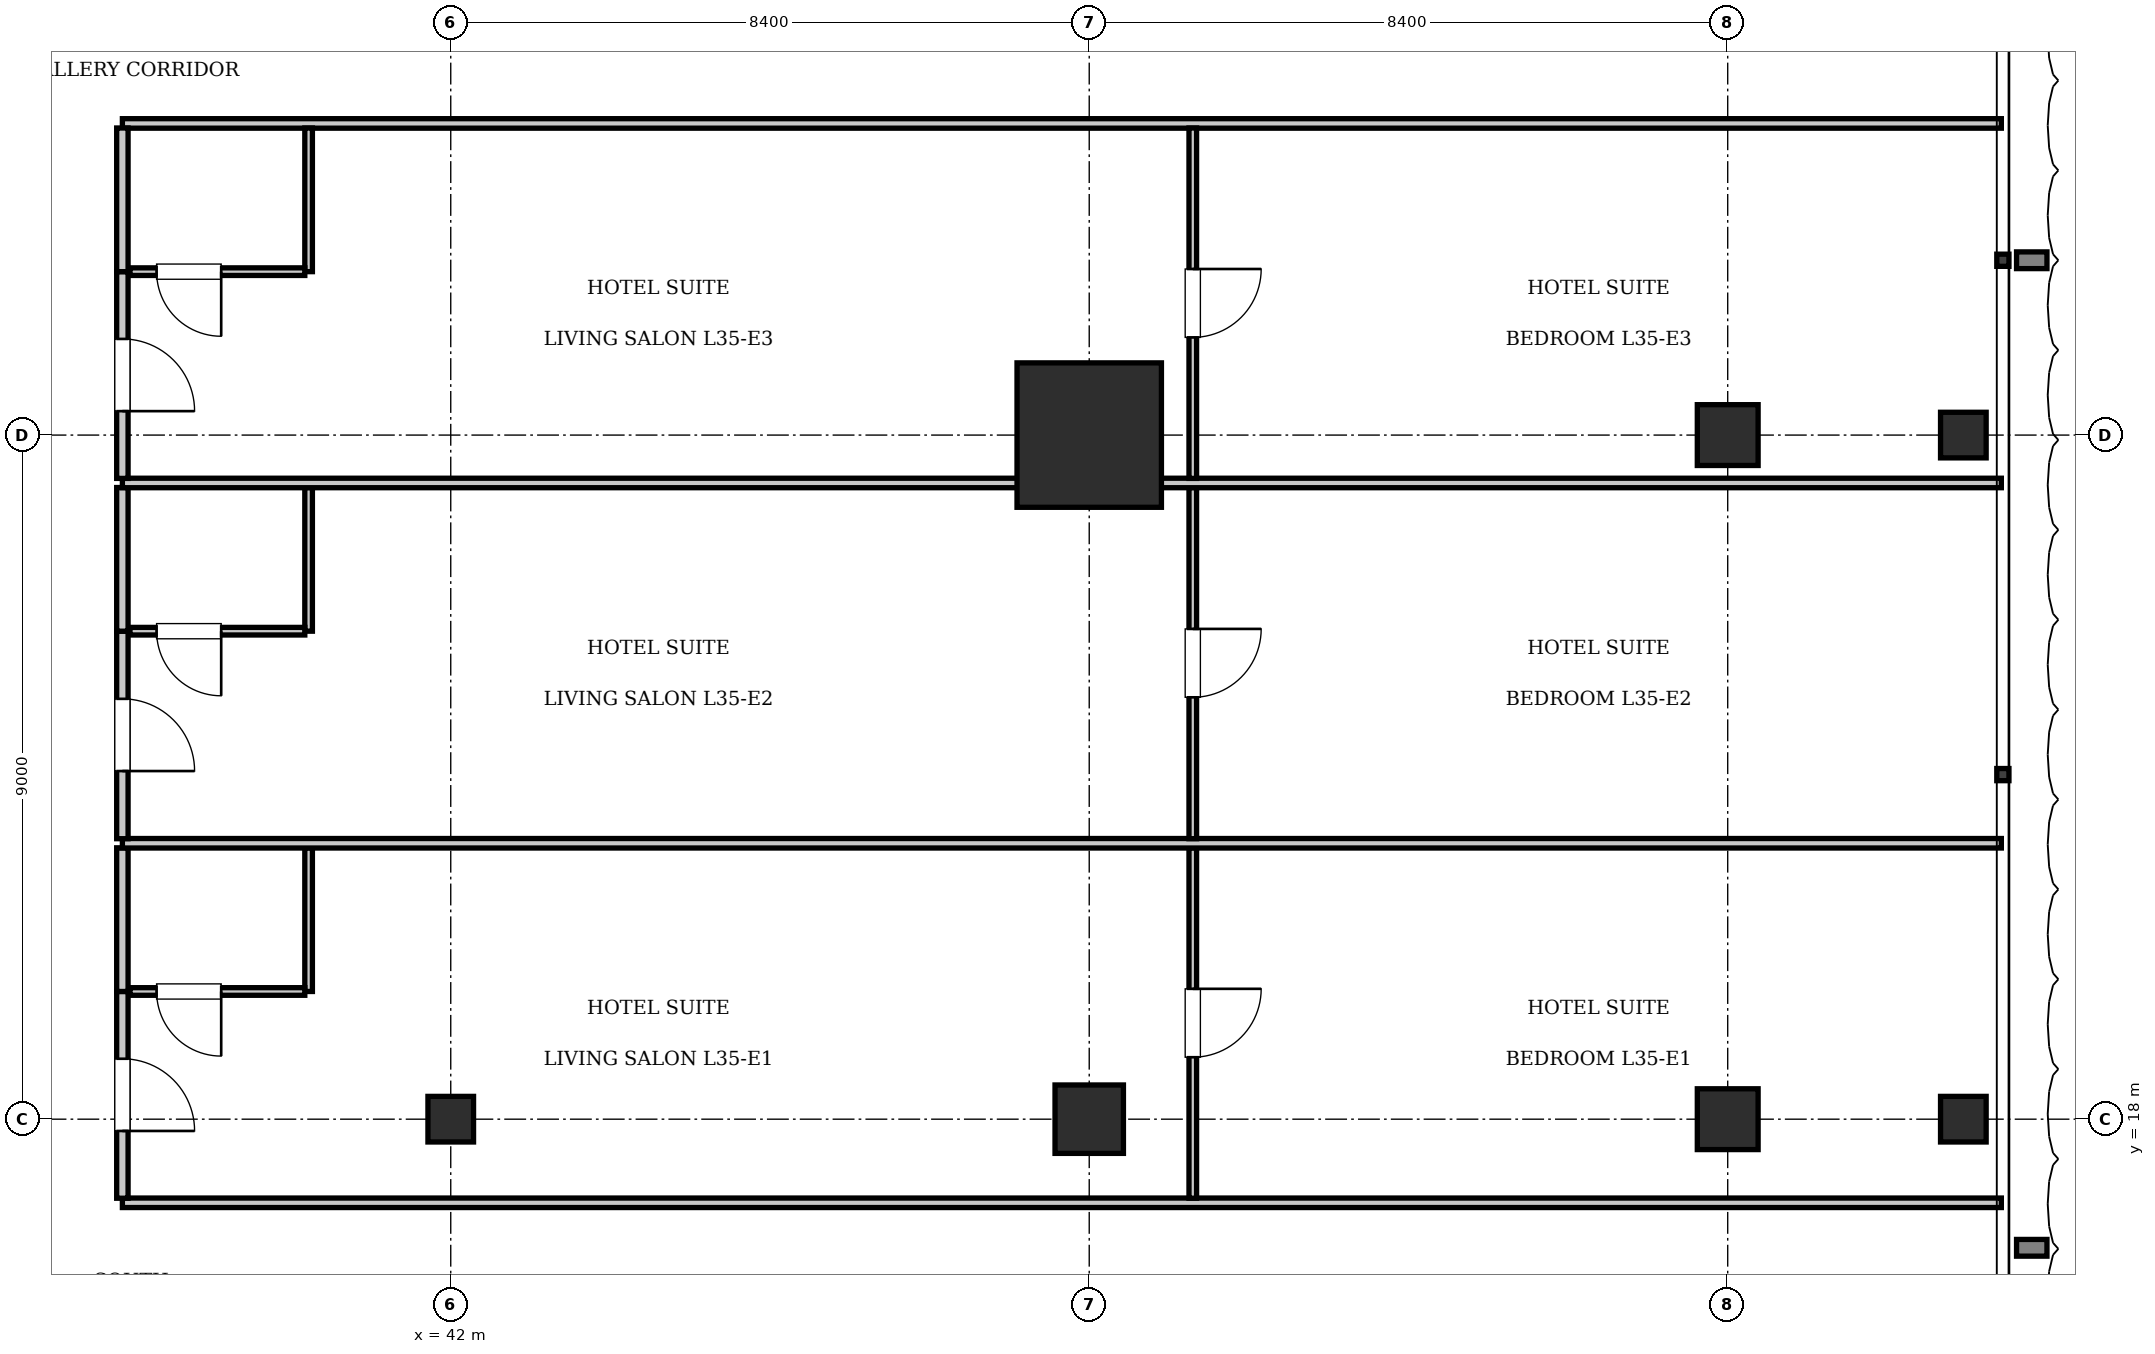
"""IFC4 building model, lengths in metres.
Left out: names, types, materials, properties, quantities, classifications, styles, units other than length and angle.
Written with IfcOpenShell. Run it as: python <this file> out.ifc"""

import sys

from ifc_helpers import new_model, si_unit, direction, frame, frame_2d, origin, origin_2d, place, context, subcontext, project, spatial, rectangle, i_section, extrude, element, fill, save


model = new_model("IFC4")
c1 = context("Model", 3, precision=1e-05, world=origin(), true_north=direction((0.0, 1.0)))
c2 = subcontext(c1, "Body", "Model", "MODEL_VIEW")
j1 = project(units=[si_unit("LENGTHUNIT", "METRE"), si_unit("PLANEANGLEUNIT", "RADIAN")], contexts=[c1])
p1 = place(None, origin())
s1 = spatial("IfcSite", under=j1, at=p1, CompositionType="ELEMENT")
p2 = place(p1, origin())
s2 = spatial("IfcBuilding", under=s1, at=p2, CompositionType="ELEMENT")
p3 = place(p2, frame((0.0, 0.0, 146.65)))
s3 = spatial("IfcBuildingStorey", under=s2, at=p3, CompositionType="ELEMENT", Elevation=146.65)
p4 = place(p3, frame((50.4, 27.0, 0.0), z_axis=(0.0, 0.0, 1.0), x_axis=(1.0, 0.0, 0.0)))
e1 = element("IfcColumn", 1, at=p4, inside=s3, PredefinedType="COLUMN", context=c2, shape_type="SweptSolid", body=[
    extrude(rectangle(XDim=1.9, YDim=1.9, at=origin_2d()), origin(), (0.0, 0.0, 1.0), 3.85),
])
p5 = place(p3, frame((50.4, 18.0, 0.0), z_axis=(0.0, 0.0, 1.0), x_axis=(1.0, 0.0, 0.0)))
e2 = element("IfcColumn", 2, at=p5, inside=s3, PredefinedType="COLUMN", context=c2, shape_type="SweptSolid", body=[
    extrude(rectangle(XDim=0.9, YDim=0.9, at=origin_2d()), origin(), (0.0, 0.0, 1.0), 3.85),
])
p6 = place(p3, frame((42.0, 18.0, 0.0), z_axis=(0.0, 0.0, 1.0), x_axis=(1.0, 0.0, 0.0)))
e3 = element("IfcColumn", 3, at=p6, inside=s3, PredefinedType="COLUMN", context=c2, shape_type="SweptSolid", body=[
    extrude(i_section(OverallWidth=0.6, OverallDepth=0.6, WebThickness=0.025, FlangeThickness=0.038, at=origin_2d()), origin(), (0.0, 0.0, 1.0), 3.85),
])
for number, where, z_axis, x_axis in (
    (4, (58.8, 18.0, 0.0), (0.0, 0.0, 1.0), (1.0, 0.0, 0.0)),
    (5, (58.8, 27.0, 0.0), (0.0, 0.0, 1.0), (1.0, 0.0, 0.0)),
):
    element("IfcColumn", number, at=place(p3, frame(where, z_axis=z_axis, x_axis=x_axis)), inside=s3, PredefinedType="COLUMN", context=c2, shape_type="SweptSolid", body=[
        extrude(rectangle(XDim=0.8, YDim=0.8, at=origin_2d()), origin(), (0.0, 0.0, 1.0), 3.85),
    ])
for number, where, z_axis, x_axis in (
    (6, (61.9, 18.0, 0.0), (0.0, 0.0, 1.0), (1.0, 0.0, 0.0)),
    (7, (61.9, 27.0, 0.0), (0.0, 0.0, 1.0), (1.0, 0.0, 0.0)),
):
    element("IfcColumn", number, at=place(p3, frame(where, z_axis=z_axis, x_axis=x_axis)), inside=s3, PredefinedType="COLUMN", context=c2, shape_type="SweptSolid", body=[
        extrude(i_section(OverallWidth=0.6, OverallDepth=0.6, WebThickness=0.025, FlangeThickness=0.038, at=origin_2d()), origin(), (0.0, 0.0, 1.0), 3.85),
    ])
for number, where, z_axis, x_axis in (
    (8, (37.68, 16.9, 0.0), (0.0, 0.0, 1.0), (1.0, 0.0, 0.0)),
    (9, (37.68, 31.1, 0.0), (0.0, 0.0, 1.0), (1.0, 0.0, 0.0)),
):
    element("IfcWall", number, at=place(p3, frame(where, z_axis=z_axis, x_axis=x_axis)), inside=s3, PredefinedType="PARTITIONING", context=c2, shape_type="SweptSolid", body=[
        extrude(rectangle(XDim=24.72, YDim=0.125, at=frame_2d((12.36, 0.0))), origin(), (0.0, 0.0, 1.0), 3.61),
    ])
p7 = place(p3, frame((37.68, 16.96, 0.0), z_axis=(0.0, 0.0, 1.0), x_axis=(0.0, 1.0, 0.0)))
e10 = element("IfcWall", 10, at=p7, inside=s3, PredefinedType="PARTITIONING", context=c2, shape_type="SweptSolid", body=[
    extrude(rectangle(XDim=2.72, YDim=0.15, at=frame_2d((1.36, 0.0))), origin(), (0.0, 0.0, 1.0), 3.293),
])
p8 = place(p7, frame((0.885, 0.0, 0.0)))
e11 = element("IfcOpeningElement", 11, at=p8, cuts=e10, PredefinedType="OPENING", context=c2, shape_type="SweptSolid", body=[
    extrude(rectangle(XDim=0.95, YDim=2.15, at=frame_2d((0.475, 1.075))), frame((0.0, 0.085, 0.0), z_axis=(0.0, -1.0, 0.0), x_axis=(1.0, 0.0, 0.0)), (0.0, 0.0, 1.0), 0.17),
])
p9 = place(p3, frame((37.68, 19.68, 0.0), z_axis=(0.0, 0.0, 1.0), x_axis=(0.0, 1.0, 0.0)))
e12 = element("IfcWall", 12, at=p9, inside=s3, PredefinedType="PARTITIONING", context=c2, shape_type="SweptSolid", body=[
    extrude(rectangle(XDim=1.89, YDim=0.15, at=frame_2d((0.945, 0.0))), origin(), (0.0, 0.0, 1.0), 3.61),
])
p10 = place(p3, frame((40.13, 19.68, 0.0), z_axis=(0.0, 0.0, 1.0), x_axis=(0.0, 1.0, 0.0)))
e13 = element("IfcWall", 13, at=p10, inside=s3, PredefinedType="PARTITIONING", context=c2, shape_type="SweptSolid", body=[
    extrude(rectangle(XDim=1.89, YDim=0.1, at=frame_2d((0.945, 0.0))), origin(), (0.0, 0.0, 1.0), 3.61),
])
p11 = place(p3, frame((37.78, 19.68, 0.0), z_axis=(0.0, 0.0, 1.0), x_axis=(1.0, 0.0, 0.0)))
e14 = element("IfcWall", 14, at=p11, inside=s3, PredefinedType="PARTITIONING", context=c2, shape_type="SweptSolid", body=[
    extrude(rectangle(XDim=2.3, YDim=0.1, at=frame_2d((1.15, 0.0))), origin(), (0.0, 0.0, 1.0), 3.61),
])
p12 = place(p11, frame((0.35, 0.0, 0.0)))
e15 = element("IfcOpeningElement", 15, at=p12, cuts=e14, PredefinedType="OPENING", context=c2, shape_type="SweptSolid", body=[
    extrude(rectangle(XDim=0.85, YDim=2.1, at=frame_2d((0.425, 1.05))), frame((0.0, 0.06, 0.0), z_axis=(0.0, -1.0, 0.0), x_axis=(1.0, 0.0, 0.0)), (0.0, 0.0, 1.0), 0.12),
])
p13 = place(p3, frame((51.762, 16.96, 0.0), z_axis=(0.0, 0.0, 1.0), x_axis=(0.0, 1.0, 0.0)))
e16 = element("IfcWall", 16, at=p13, inside=s3, PredefinedType="PARTITIONING", context=c2, shape_type="SweptSolid", body=[
    extrude(rectangle(XDim=4.61, YDim=0.1, at=frame_2d((2.305, 0.0))), origin(), (0.0, 0.0, 1.0), 3.61),
])
p14 = place(p13, frame((1.855, 0.0, 0.0)))
e17 = element("IfcOpeningElement", 17, at=p14, cuts=e16, PredefinedType="OPENING", context=c2, shape_type="SweptSolid", body=[
    extrude(rectangle(XDim=0.9, YDim=2.1, at=frame_2d((0.45, 1.05))), frame((0.0, 0.06, 0.0), z_axis=(0.0, -1.0, 0.0), x_axis=(1.0, 0.0, 0.0)), (0.0, 0.0, 1.0), 0.12),
])
p15 = place(p3, frame((37.68, 21.63, 0.0), z_axis=(0.0, 0.0, 1.0), x_axis=(1.0, 0.0, 0.0)))
e18 = element("IfcWall", 18, at=p15, inside=s3, PredefinedType="PARTITIONING", context=c2, shape_type="SweptSolid", body=[
    extrude(rectangle(XDim=24.72, YDim=0.125, at=frame_2d((12.36, 0.0))), origin(), (0.0, 0.0, 1.0), 3.61),
])
p16 = place(p3, frame((37.68, 21.69, 0.0), z_axis=(0.0, 0.0, 1.0), x_axis=(0.0, 1.0, 0.0)))
e19 = element("IfcWall", 19, at=p16, inside=s3, PredefinedType="PARTITIONING", context=c2, shape_type="SweptSolid", body=[
    extrude(rectangle(XDim=2.73, YDim=0.15, at=frame_2d((1.365, 0.0))), origin(), (0.0, 0.0, 1.0), 3.61),
])
p17 = place(p16, frame((0.89, 0.0, 0.0)))
e20 = element("IfcOpeningElement", 20, at=p17, cuts=e19, PredefinedType="OPENING", context=c2, shape_type="SweptSolid", body=[
    extrude(rectangle(XDim=0.95, YDim=2.15, at=frame_2d((0.475, 1.075))), frame((0.0, 0.085, 0.0), z_axis=(0.0, -1.0, 0.0), x_axis=(1.0, 0.0, 0.0)), (0.0, 0.0, 1.0), 0.17),
])
p18 = place(p3, frame((37.68, 24.42, 0.0), z_axis=(0.0, 0.0, 1.0), x_axis=(0.0, 1.0, 0.0)))
e21 = element("IfcWall", 21, at=p18, inside=s3, PredefinedType="PARTITIONING", context=c2, shape_type="SweptSolid", body=[
    extrude(rectangle(XDim=1.89, YDim=0.15, at=frame_2d((0.945, 0.0))), origin(), (0.0, 0.0, 1.0), 3.61),
])
p19 = place(p3, frame((40.13, 24.42, 0.0), z_axis=(0.0, 0.0, 1.0), x_axis=(0.0, 1.0, 0.0)))
e22 = element("IfcWall", 22, at=p19, inside=s3, PredefinedType="PARTITIONING", context=c2, shape_type="SweptSolid", body=[
    extrude(rectangle(XDim=1.89, YDim=0.1, at=frame_2d((0.945, 0.0))), origin(), (0.0, 0.0, 1.0), 3.61),
])
p20 = place(p3, frame((37.78, 24.42, 0.0), z_axis=(0.0, 0.0, 1.0), x_axis=(1.0, 0.0, 0.0)))
e23 = element("IfcWall", 23, at=p20, inside=s3, PredefinedType="PARTITIONING", context=c2, shape_type="SweptSolid", body=[
    extrude(rectangle(XDim=2.3, YDim=0.1, at=frame_2d((1.15, 0.0))), origin(), (0.0, 0.0, 1.0), 3.61),
])
p21 = place(p20, frame((0.35, 0.0, 0.0)))
e24 = element("IfcOpeningElement", 24, at=p21, cuts=e23, PredefinedType="OPENING", context=c2, shape_type="SweptSolid", body=[
    extrude(rectangle(XDim=0.85, YDim=2.1, at=frame_2d((0.425, 1.05))), frame((0.0, 0.06, 0.0), z_axis=(0.0, -1.0, 0.0), x_axis=(1.0, 0.0, 0.0)), (0.0, 0.0, 1.0), 0.12),
])
p22 = place(p3, frame((51.762, 21.69, 0.0), z_axis=(0.0, 0.0, 1.0), x_axis=(0.0, 1.0, 0.0)))
e25 = element("IfcWall", 25, at=p22, inside=s3, PredefinedType="PARTITIONING", context=c2, shape_type="SweptSolid", body=[
    extrude(rectangle(XDim=4.62, YDim=0.1, at=frame_2d((2.31, 0.0))), origin(), (0.0, 0.0, 1.0), 3.61),
])
p23 = place(p22, frame((1.86, 0.0, 0.0)))
e26 = element("IfcOpeningElement", 26, at=p23, cuts=e25, PredefinedType="OPENING", context=c2, shape_type="SweptSolid", body=[
    extrude(rectangle(XDim=0.9, YDim=2.1, at=frame_2d((0.45, 1.05))), frame((0.0, 0.06, 0.0), z_axis=(0.0, -1.0, 0.0), x_axis=(1.0, 0.0, 0.0)), (0.0, 0.0, 1.0), 0.12),
])
p24 = place(p3, frame((37.68, 26.37, 0.0), z_axis=(0.0, 0.0, 1.0), x_axis=(1.0, 0.0, 0.0)))
e27 = element("IfcWall", 27, at=p24, inside=s3, PredefinedType="PARTITIONING", context=c2, shape_type="SweptSolid", body=[
    extrude(rectangle(XDim=24.72, YDim=0.125, at=frame_2d((12.36, 0.0))), origin(), (0.0, 0.0, 1.0), 3.61),
])
p25 = place(p3, frame((37.68, 26.43, 0.0), z_axis=(0.0, 0.0, 1.0), x_axis=(0.0, 1.0, 0.0)))
e28 = element("IfcWall", 28, at=p25, inside=s3, PredefinedType="PARTITIONING", context=c2, shape_type="SweptSolid", body=[
    extrude(rectangle(XDim=2.72, YDim=0.15, at=frame_2d((1.36, 0.0))), origin(), (0.0, 0.0, 1.0), 3.61),
])
p26 = place(p25, frame((0.885, 0.0, 0.0)))
e29 = element("IfcOpeningElement", 29, at=p26, cuts=e28, PredefinedType="OPENING", context=c2, shape_type="SweptSolid", body=[
    extrude(rectangle(XDim=0.95, YDim=2.15, at=frame_2d((0.475, 1.075))), frame((0.0, 0.085, 0.0), z_axis=(0.0, -1.0, 0.0), x_axis=(1.0, 0.0, 0.0)), (0.0, 0.0, 1.0), 0.17),
])
p27 = place(p3, frame((37.68, 29.15, 0.0), z_axis=(0.0, 0.0, 1.0), x_axis=(0.0, 1.0, 0.0)))
e30 = element("IfcWall", 30, at=p27, inside=s3, PredefinedType="PARTITIONING", context=c2, shape_type="SweptSolid", body=[
    extrude(rectangle(XDim=1.89, YDim=0.15, at=frame_2d((0.945, 0.0))), origin(), (0.0, 0.0, 1.0), 3.61),
])
p28 = place(p3, frame((40.13, 29.15, 0.0), z_axis=(0.0, 0.0, 1.0), x_axis=(0.0, 1.0, 0.0)))
e31 = element("IfcWall", 31, at=p28, inside=s3, PredefinedType="PARTITIONING", context=c2, shape_type="SweptSolid", body=[
    extrude(rectangle(XDim=1.89, YDim=0.1, at=frame_2d((0.945, 0.0))), origin(), (0.0, 0.0, 1.0), 3.61),
])
p29 = place(p3, frame((37.78, 29.15, 0.0), z_axis=(0.0, 0.0, 1.0), x_axis=(1.0, 0.0, 0.0)))
e32 = element("IfcWall", 32, at=p29, inside=s3, PredefinedType="PARTITIONING", context=c2, shape_type="SweptSolid", body=[
    extrude(rectangle(XDim=2.3, YDim=0.1, at=frame_2d((1.15, 0.0))), origin(), (0.0, 0.0, 1.0), 3.61),
])
p30 = place(p29, frame((0.35, 0.0, 0.0)))
e33 = element("IfcOpeningElement", 33, at=p30, cuts=e32, PredefinedType="OPENING", context=c2, shape_type="SweptSolid", body=[
    extrude(rectangle(XDim=0.85, YDim=2.1, at=frame_2d((0.425, 1.05))), frame((0.0, 0.06, 0.0), z_axis=(0.0, -1.0, 0.0), x_axis=(1.0, 0.0, 0.0)), (0.0, 0.0, 1.0), 0.12),
])
p31 = place(p3, frame((51.762, 26.43, 0.0), z_axis=(0.0, 0.0, 1.0), x_axis=(0.0, 1.0, 0.0)))
e34 = element("IfcWall", 34, at=p31, inside=s3, PredefinedType="PARTITIONING", context=c2, shape_type="SweptSolid", body=[
    extrude(rectangle(XDim=4.61, YDim=0.1, at=frame_2d((2.305, 0.0))), origin(), (0.0, 0.0, 1.0), 3.61),
])
p32 = place(p31, frame((1.855, 0.0, 0.0)))
e35 = element("IfcOpeningElement", 35, at=p32, cuts=e34, PredefinedType="OPENING", context=c2, shape_type="SweptSolid", body=[
    extrude(rectangle(XDim=0.9, YDim=2.1, at=frame_2d((0.45, 1.05))), frame((0.0, 0.06, 0.0), z_axis=(0.0, -1.0, 0.0), x_axis=(1.0, 0.0, 0.0)), (0.0, 0.0, 1.0), 0.12),
])
p33 = place(p12, frame((0.85, 0.0, 0.0), z_axis=(0.0, 0.0, 1.0), x_axis=(-1.0, 0.0, 0.0)))
e36 = element("IfcDoor", 36, at=p33, inside=s3, OperationType="SINGLE_SWING_LEFT", PredefinedType="DOOR", context=c2, shape_type="SweptSolid", body=[
    extrude(rectangle(XDim=0.85, YDim=2.1, at=frame_2d((0.425, 1.05))), frame((0.0, 0.025, 0.0), z_axis=(0.0, -1.0, 0.0), x_axis=(1.0, 0.0, 0.0)), (0.0, 0.0, 1.0), 0.05),
])
fill(e15, e36)
p34 = place(p8, frame((0.95, 0.0, 0.0), z_axis=(0.0, 0.0, 1.0), x_axis=(-1.0, 0.0, 0.0)))
e37 = element("IfcDoor", 37, at=p34, inside=s3, OperationType="SINGLE_SWING_RIGHT", PredefinedType="DOOR", context=c2, shape_type="SweptSolid", body=[
    extrude(rectangle(XDim=0.95, YDim=2.15, at=frame_2d((0.475, 1.075))), frame((0.0, 0.025, 0.0), z_axis=(0.0, -1.0, 0.0), x_axis=(1.0, 0.0, 0.0)), (0.0, 0.0, 1.0), 0.05),
])
fill(e11, e37)
p35 = place(p14, frame((0.9, 0.0, 0.0), z_axis=(0.0, 0.0, 1.0), x_axis=(-1.0, 0.0, 0.0)))
e38 = element("IfcDoor", 38, at=p35, inside=s3, OperationType="SINGLE_SWING_LEFT", PredefinedType="DOOR", context=c2, shape_type="SweptSolid", body=[
    extrude(rectangle(XDim=0.9, YDim=2.1, at=frame_2d((0.45, 1.05))), frame((0.0, 0.025, 0.0), z_axis=(0.0, -1.0, 0.0), x_axis=(1.0, 0.0, 0.0)), (0.0, 0.0, 1.0), 0.05),
])
fill(e17, e38)
p36 = place(p21, frame((0.85, 0.0, 0.0), z_axis=(0.0, 0.0, 1.0), x_axis=(-1.0, 0.0, 0.0)))
e39 = element("IfcDoor", 39, at=p36, inside=s3, OperationType="SINGLE_SWING_LEFT", PredefinedType="DOOR", context=c2, shape_type="SweptSolid", body=[
    extrude(rectangle(XDim=0.85, YDim=2.1, at=frame_2d((0.425, 1.05))), frame((0.0, 0.025, 0.0), z_axis=(0.0, -1.0, 0.0), x_axis=(1.0, 0.0, 0.0)), (0.0, 0.0, 1.0), 0.05),
])
fill(e24, e39)
p37 = place(p17, frame((0.95, 0.0, 0.0), z_axis=(0.0, 0.0, 1.0), x_axis=(-1.0, 0.0, 0.0)))
e40 = element("IfcDoor", 40, at=p37, inside=s3, OperationType="SINGLE_SWING_RIGHT", PredefinedType="DOOR", context=c2, shape_type="SweptSolid", body=[
    extrude(rectangle(XDim=0.95, YDim=2.15, at=frame_2d((0.475, 1.075))), frame((0.0, 0.025, 0.0), z_axis=(0.0, -1.0, 0.0), x_axis=(1.0, 0.0, 0.0)), (0.0, 0.0, 1.0), 0.05),
])
fill(e20, e40)
p38 = place(p23, frame((0.9, 0.0, 0.0), z_axis=(0.0, 0.0, 1.0), x_axis=(-1.0, 0.0, 0.0)))
e41 = element("IfcDoor", 41, at=p38, inside=s3, OperationType="SINGLE_SWING_LEFT", PredefinedType="DOOR", context=c2, shape_type="SweptSolid", body=[
    extrude(rectangle(XDim=0.9, YDim=2.1, at=frame_2d((0.45, 1.05))), frame((0.0, 0.025, 0.0), z_axis=(0.0, -1.0, 0.0), x_axis=(1.0, 0.0, 0.0)), (0.0, 0.0, 1.0), 0.05),
])
fill(e26, e41)
p39 = place(p30, frame((0.85, 0.0, 0.0), z_axis=(0.0, 0.0, 1.0), x_axis=(-1.0, 0.0, 0.0)))
e42 = element("IfcDoor", 42, at=p39, inside=s3, OperationType="SINGLE_SWING_LEFT", PredefinedType="DOOR", context=c2, shape_type="SweptSolid", body=[
    extrude(rectangle(XDim=0.85, YDim=2.1, at=frame_2d((0.425, 1.05))), frame((0.0, 0.025, 0.0), z_axis=(0.0, -1.0, 0.0), x_axis=(1.0, 0.0, 0.0)), (0.0, 0.0, 1.0), 0.05),
])
fill(e33, e42)
p40 = place(p26, frame((0.95, 0.0, 0.0), z_axis=(0.0, 0.0, 1.0), x_axis=(-1.0, 0.0, 0.0)))
e43 = element("IfcDoor", 43, at=p40, inside=s3, OperationType="SINGLE_SWING_RIGHT", PredefinedType="DOOR", context=c2, shape_type="SweptSolid", body=[
    extrude(rectangle(XDim=0.95, YDim=2.15, at=frame_2d((0.475, 1.075))), frame((0.0, 0.025, 0.0), z_axis=(0.0, -1.0, 0.0), x_axis=(1.0, 0.0, 0.0)), (0.0, 0.0, 1.0), 0.05),
])
fill(e29, e43)
p41 = place(p32, frame((0.9, 0.0, 0.0), z_axis=(0.0, 0.0, 1.0), x_axis=(-1.0, 0.0, 0.0)))
e44 = element("IfcDoor", 44, at=p41, inside=s3, OperationType="SINGLE_SWING_LEFT", PredefinedType="DOOR", context=c2, shape_type="SweptSolid", body=[
    extrude(rectangle(XDim=0.9, YDim=2.1, at=frame_2d((0.45, 1.05))), frame((0.0, 0.025, 0.0), z_axis=(0.0, -1.0, 0.0), x_axis=(1.0, 0.0, 0.0)), (0.0, 0.0, 1.0), 0.05),
])
fill(e35, e44)
save(model, sys.argv[1])
